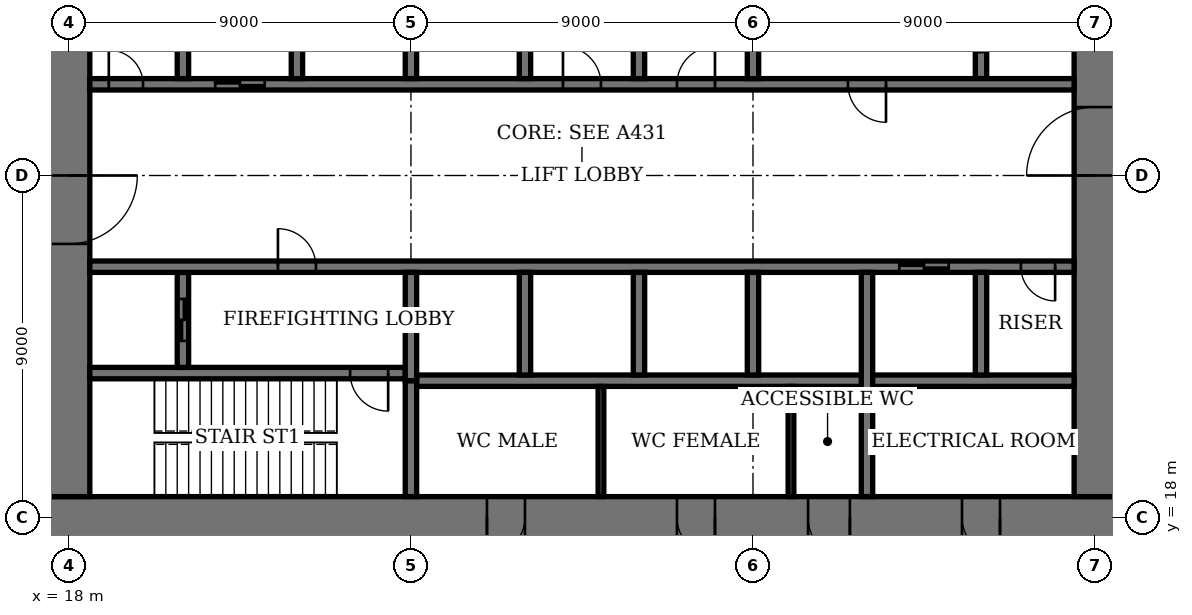
"""IFC4 building model, lengths in metres.
Left out: names, types, materials, properties, quantities, classifications, styles, units other than length and angle.
Written with IfcOpenShell. Run it as: python <this file> out.ifc"""

import sys

from ifc_helpers import new_model, si_unit, direction, frame, frame_2d, origin, place, context, subcontext, project, spatial, rectangle, extrude, element, fill, save


model = new_model("IFC4")
c1 = context("Model", 3, precision=1e-05, world=origin(), true_north=direction((0.0, 1.0)))
c2 = subcontext(c1, "Body", "Model", "MODEL_VIEW")
j1 = project(units=[si_unit("LENGTHUNIT", "METRE"), si_unit("PLANEANGLEUNIT", "RADIAN")], contexts=[c1])
p1 = place(None, origin())
s1 = spatial("IfcSite", under=j1, at=p1, CompositionType="ELEMENT")
p2 = place(p1, origin())
s2 = spatial("IfcBuilding", under=s1, at=p2, CompositionType="ELEMENT")
p3 = place(p2, frame((0.0, 0.0, 234.4)))
s3 = spatial("IfcBuildingStorey", under=s2, at=p3, CompositionType="ELEMENT", Elevation=234.4)
p4 = place(p3, frame((17.45, 18.0, 0.0), z_axis=(0.0, 0.0, 1.0), x_axis=(1.0, 0.0, 0.0)))
e1 = element("IfcWall", 1, at=p4, inside=s3, PredefinedType="SHEAR", context=c2, shape_type="SweptSolid", body=[
    extrude(rectangle(XDim=28.1, YDim=1.1, at=frame_2d((14.05, 0.0))), origin(), (0.0, 0.0, 1.0), 5.0),
])
p5 = place(p4, frame((11.55, 0.0, 0.0)))
e2 = element("IfcOpeningElement", 2, at=p5, cuts=e1, PredefinedType="OPENING", context=c2, shape_type="SweptSolid", body=[
    extrude(rectangle(XDim=1.0, YDim=2.4, at=frame_2d((0.5, 1.2))), frame((0.0, 0.56, 0.0), z_axis=(0.0, -1.0, 0.0), x_axis=(1.0, 0.0, 0.0)), (0.0, 0.0, 1.0), 1.12),
])
p6 = place(p4, frame((16.55, 0.0, 0.0)))
e3 = element("IfcOpeningElement", 3, at=p6, cuts=e1, PredefinedType="OPENING", context=c2, shape_type="SweptSolid", body=[
    extrude(rectangle(XDim=1.0, YDim=2.4, at=frame_2d((0.5, 1.2))), frame((0.0, 0.56, 0.0), z_axis=(0.0, -1.0, 0.0), x_axis=(1.0, 0.0, 0.0)), (0.0, 0.0, 1.0), 1.12),
])
p7 = place(p4, frame((20.0, 0.0, 0.0)))
e4 = element("IfcOpeningElement", 4, at=p7, cuts=e1, PredefinedType="OPENING", context=c2, shape_type="SweptSolid", body=[
    extrude(rectangle(XDim=1.1, YDim=2.4, at=frame_2d((0.55, 1.2))), frame((0.0, 0.56, 0.0), z_axis=(0.0, -1.0, 0.0), x_axis=(1.0, 0.0, 0.0)), (0.0, 0.0, 1.0), 1.12),
])
p8 = place(p4, frame((24.05, 0.0, 0.0)))
e5 = element("IfcOpeningElement", 5, at=p8, cuts=e1, PredefinedType="OPENING", context=c2, shape_type="SweptSolid", body=[
    extrude(rectangle(XDim=1.0, YDim=2.4, at=frame_2d((0.5, 1.2))), frame((0.0, 0.56, 0.0), z_axis=(0.0, -1.0, 0.0), x_axis=(1.0, 0.0, 0.0)), (0.0, 0.0, 1.0), 1.12),
])
p9 = place(p3, frame((18.0, 35.45, 0.0), z_axis=(0.0, 0.0, 1.0), x_axis=(0.0, -1.0, 0.0)))
e6 = element("IfcWall", 6, at=p9, inside=s3, PredefinedType="SHEAR", context=c2, shape_type="SweptSolid", body=[
    extrude(rectangle(XDim=16.9, YDim=1.1, at=frame_2d((8.45, 0.0))), origin(), (0.0, 0.0, 1.0), 5.0),
])
p10 = place(p9, frame((8.45, 0.0, 0.0)))
e7 = element("IfcOpeningElement", 7, at=p10, cuts=e6, PredefinedType="OPENING", context=c2, shape_type="SweptSolid", body=[
    extrude(rectangle(XDim=1.8, YDim=2.4, at=frame_2d((0.9, 1.2))), frame((0.0, 0.56, 0.0), z_axis=(0.0, -1.0, 0.0), x_axis=(1.0, 0.0, 0.0)), (0.0, 0.0, 1.0), 1.12),
])
p11 = place(p3, frame((45.0, 18.55, 0.0), z_axis=(0.0, 0.0, 1.0), x_axis=(0.0, 1.0, 0.0)))
e8 = element("IfcWall", 8, at=p11, inside=s3, PredefinedType="SHEAR", context=c2, shape_type="SweptSolid", body=[
    extrude(rectangle(XDim=16.9, YDim=1.1, at=frame_2d((8.45, 0.0))), origin(), (0.0, 0.0, 1.0), 5.0),
])
p12 = place(p11, frame((8.45, 0.0, 0.0)))
e9 = element("IfcOpeningElement", 9, at=p12, cuts=e8, PredefinedType="OPENING", context=c2, shape_type="SweptSolid", body=[
    extrude(rectangle(XDim=1.8, YDim=2.4, at=frame_2d((0.9, 1.2))), frame((0.0, 0.56, 0.0), z_axis=(0.0, -1.0, 0.0), x_axis=(1.0, 0.0, 0.0)), (0.0, 0.0, 1.0), 1.12),
])
p13 = place(p3, frame((18.55, 21.8, 0.0), z_axis=(0.0, 0.0, 1.0), x_axis=(1.0, 0.0, 0.0)))
e10 = element("IfcWall", 10, at=p13, inside=s3, PredefinedType="SHEAR", context=c2, shape_type="SweptSolid", body=[
    extrude(rectangle(XDim=8.3, YDim=0.3, at=frame_2d((4.15, 0.0))), origin(), (0.0, 0.0, 1.0), 5.0),
])
p14 = place(p13, frame((6.85, 0.0, 0.0)))
e11 = element("IfcOpeningElement", 11, at=p14, cuts=e10, PredefinedType="OPENING", context=c2, shape_type="SweptSolid", body=[
    extrude(rectangle(XDim=1.0, YDim=2.4, at=frame_2d((0.5, 1.2))), frame((0.0, 0.16, 0.0), z_axis=(0.0, -1.0, 0.0), x_axis=(1.0, 0.0, 0.0)), (0.0, 0.0, 1.0), 0.32),
])
p15 = place(p3, frame((27.0, 18.55, 0.0), z_axis=(0.0, 0.0, 1.0), x_axis=(0.0, 1.0, 0.0)))
e12 = element("IfcWall", 12, at=p15, inside=s3, PredefinedType="SHEAR", context=c2, shape_type="SweptSolid", body=[
    extrude(rectangle(XDim=3.05, YDim=0.3, at=frame_2d((1.525, 0.0))), origin(), (0.0, 0.0, 1.0), 5.0),
])
p16 = place(p3, frame((21.0, 21.95, 0.0), z_axis=(0.0, 0.0, 1.0), x_axis=(0.0, 1.0, 0.0)))
e13 = element("IfcWall", 13, at=p16, inside=s3, PredefinedType="SHEAR", context=c2, shape_type="SweptSolid", body=[
    extrude(rectangle(XDim=2.5, YDim=0.3, at=frame_2d((1.25, 0.0))), origin(), (0.0, 0.0, 1.0), 5.0),
])
p17 = place(p16, frame((0.7, 0.0, 0.0)))
e14 = element("IfcOpeningElement", 14, at=p17, cuts=e13, PredefinedType="OPENING", context=c2, shape_type="SweptSolid", body=[
    extrude(rectangle(XDim=1.1, YDim=2.4, at=frame_2d((0.55, 1.2))), frame((0.0, 0.16, 0.0), z_axis=(0.0, -1.0, 0.0), x_axis=(1.0, 0.0, 0.0)), (0.0, 0.0, 1.0), 0.32),
])
p18 = place(p3, frame((42.0, 29.55, 0.0), z_axis=(0.0, 0.0, 1.0), x_axis=(0.0, 1.0, 0.0)))
e15 = element("IfcWall", 15, at=p18, inside=s3, PredefinedType="SHEAR", context=c2, shape_type="SweptSolid", body=[
    extrude(rectangle(XDim=2.5, YDim=0.3, at=frame_2d((1.25, 0.0))), origin(), (0.0, 0.0, 1.0), 5.0),
])
p19 = place(p18, frame((0.7, 0.0, 0.0)))
e16 = element("IfcOpeningElement", 16, at=p19, cuts=e15, PredefinedType="OPENING", context=c2, shape_type="SweptSolid", body=[
    extrude(rectangle(XDim=1.1, YDim=2.4, at=frame_2d((0.55, 1.2))), frame((0.0, 0.16, 0.0), z_axis=(0.0, -1.0, 0.0), x_axis=(1.0, 0.0, 0.0)), (0.0, 0.0, 1.0), 0.32),
])
p20 = place(p3, frame((18.55, 24.6, 0.0), z_axis=(0.0, 0.0, 1.0), x_axis=(1.0, 0.0, 0.0)))
e17 = element("IfcWall", 17, at=p20, inside=s3, PredefinedType="SHEAR", context=c2, shape_type="SweptSolid", body=[
    extrude(rectangle(XDim=25.9, YDim=0.3, at=frame_2d((12.95, 0.0))), origin(), (0.0, 0.0, 1.0), 5.0),
])
p21 = place(p20, frame((4.95, 0.0, 0.0)))
e18 = element("IfcOpeningElement", 18, at=p21, cuts=e17, PredefinedType="OPENING", context=c2, shape_type="SweptSolid", body=[
    extrude(rectangle(XDim=1.0, YDim=2.4, at=frame_2d((0.5, 1.2))), frame((0.0, 0.16, 0.0), z_axis=(0.0, -1.0, 0.0), x_axis=(1.0, 0.0, 0.0)), (0.0, 0.0, 1.0), 0.32),
])
p22 = place(p20, frame((24.5, 0.0, 0.0)))
e19 = element("IfcOpeningElement", 19, at=p22, cuts=e17, PredefinedType="OPENING", context=c2, shape_type="SweptSolid", body=[
    extrude(rectangle(XDim=0.9, YDim=2.1, at=frame_2d((0.45, 1.05))), frame((0.0, 0.16, 0.0), z_axis=(0.0, -1.0, 0.0), x_axis=(1.0, 0.0, 0.0)), (0.0, 0.0, 1.0), 0.32),
])
p23 = place(p20, frame((21.3, 0.0, 0.0)))
e20 = element("IfcOpeningElement", 20, at=p23, cuts=e17, PredefinedType="OPENING", context=c2, shape_type="SweptSolid", body=[
    extrude(rectangle(XDim=1.3, YDim=2.4, at=frame_2d((0.65, 1.2))), frame((0.0, 0.16, 0.0), z_axis=(0.0, -1.0, 0.0), x_axis=(1.0, 0.0, 0.0)), (0.0, 0.0, 1.0), 0.32),
])
p24 = place(p3, frame((18.55, 29.4, 0.0), z_axis=(0.0, 0.0, 1.0), x_axis=(1.0, 0.0, 0.0)))
e21 = element("IfcWall", 21, at=p24, inside=s3, PredefinedType="SHEAR", context=c2, shape_type="SweptSolid", body=[
    extrude(rectangle(XDim=25.9, YDim=0.3, at=frame_2d((12.95, 0.0))), origin(), (0.0, 0.0, 1.0), 5.0),
])
p25 = place(p24, frame((19.95, 0.0, 0.0)))
e22 = element("IfcOpeningElement", 22, at=p25, cuts=e21, PredefinedType="OPENING", context=c2, shape_type="SweptSolid", body=[
    extrude(rectangle(XDim=1.0, YDim=2.4, at=frame_2d((0.5, 1.2))), frame((0.0, 0.16, 0.0), z_axis=(0.0, -1.0, 0.0), x_axis=(1.0, 0.0, 0.0)), (0.0, 0.0, 1.0), 0.32),
])
p26 = place(p24, frame((0.5, 0.0, 0.0)))
e23 = element("IfcOpeningElement", 23, at=p26, cuts=e21, PredefinedType="OPENING", context=c2, shape_type="SweptSolid", body=[
    extrude(rectangle(XDim=0.9, YDim=2.1, at=frame_2d((0.45, 1.05))), frame((0.0, 0.16, 0.0), z_axis=(0.0, -1.0, 0.0), x_axis=(1.0, 0.0, 0.0)), (0.0, 0.0, 1.0), 0.32),
])
p27 = place(p24, frame((15.45, 0.0, 0.0)))
e24 = element("IfcOpeningElement", 24, at=p27, cuts=e21, PredefinedType="OPENING", context=c2, shape_type="SweptSolid", body=[
    extrude(rectangle(XDim=1.0, YDim=2.4, at=frame_2d((0.5, 1.2))), frame((0.0, 0.16, 0.0), z_axis=(0.0, -1.0, 0.0), x_axis=(1.0, 0.0, 0.0)), (0.0, 0.0, 1.0), 0.32),
])
p28 = place(p24, frame((12.45, 0.0, 0.0)))
e25 = element("IfcOpeningElement", 25, at=p28, cuts=e21, PredefinedType="OPENING", context=c2, shape_type="SweptSolid", body=[
    extrude(rectangle(XDim=1.0, YDim=2.4, at=frame_2d((0.5, 1.2))), frame((0.0, 0.16, 0.0), z_axis=(0.0, -1.0, 0.0), x_axis=(1.0, 0.0, 0.0)), (0.0, 0.0, 1.0), 0.32),
])
p29 = place(p24, frame((3.3, 0.0, 0.0)))
e26 = element("IfcOpeningElement", 26, at=p29, cuts=e21, PredefinedType="OPENING", context=c2, shape_type="SweptSolid", body=[
    extrude(rectangle(XDim=1.3, YDim=2.4, at=frame_2d((0.65, 1.2))), frame((0.0, 0.16, 0.0), z_axis=(0.0, -1.0, 0.0), x_axis=(1.0, 0.0, 0.0)), (0.0, 0.0, 1.0), 0.32),
])
p30 = place(p3, frame((27.15, 21.6, 0.0), z_axis=(0.0, 0.0, 1.0), x_axis=(1.0, 0.0, 0.0)))
e27 = element("IfcWall", 27, at=p30, inside=s3, PredefinedType="SHEAR", context=c2, shape_type="SweptSolid", body=[
    extrude(rectangle(XDim=17.3, YDim=0.3, at=frame_2d((8.65, 0.0))), origin(), (0.0, 0.0, 1.0), 5.0),
])
for number, where, z_axis, x_axis in (
    (28, (30.0, 21.75, 0.0), (0.0, 0.0, 1.0), (0.0, 1.0, 0.0)),
    (29, (33.0, 29.55, 0.0), (0.0, 0.0, 1.0), (0.0, 1.0, 0.0)),
    (30, (33.0, 21.75, 0.0), (0.0, 0.0, 1.0), (0.0, 1.0, 0.0)),
    (31, (30.0, 29.55, 0.0), (0.0, 0.0, 1.0), (0.0, 1.0, 0.0)),
    (32, (36.0, 21.75, 0.0), (0.0, 0.0, 1.0), (0.0, 1.0, 0.0)),
    (33, (27.0, 29.55, 0.0), (0.0, 0.0, 1.0), (0.0, 1.0, 0.0)),
):
    element("IfcWall", number, at=place(p3, frame(where, z_axis=z_axis, x_axis=x_axis)), inside=s3, PredefinedType="SHEAR", context=c2, shape_type="SweptSolid", body=[
        extrude(rectangle(XDim=2.7, YDim=0.3, at=frame_2d((1.35, 0.0))), origin(), (0.0, 0.0, 1.0), 5.0),
    ])
for number, where, z_axis, x_axis in (
    (34, (39.0, 18.55, 0.0), (0.0, 0.0, 1.0), (0.0, 1.0, 0.0)),
    (35, (24.0, 29.55, 0.0), (0.0, 0.0, 1.0), (0.0, 1.0, 0.0)),
):
    element("IfcWall", number, at=place(p3, frame(where, z_axis=z_axis, x_axis=x_axis)), inside=s3, PredefinedType="SHEAR", context=c2, shape_type="SweptSolid", body=[
        extrude(rectangle(XDim=5.9, YDim=0.3, at=frame_2d((2.95, 0.0))), origin(), (0.0, 0.0, 1.0), 5.0),
    ])
for number, where, z_axis, x_axis in (
    (36, (42.0, 21.75, 0.0), (0.0, 0.0, 1.0), (0.0, 1.0, 0.0)),
    (37, (21.0, 29.55, 0.0), (0.0, 0.0, 1.0), (0.0, 1.0, 0.0)),
):
    element("IfcWall", number, at=place(p3, frame(where, z_axis=z_axis, x_axis=x_axis)), inside=s3, PredefinedType="SHEAR", context=c2, shape_type="SweptSolid", body=[
        extrude(rectangle(XDim=2.7, YDim=0.3, at=frame_2d((1.35, 0.0))), origin(), (0.0, 0.0, 1.0), 5.0),
    ])
for number, where, z_axis, x_axis in (
    (38, (27.0, 21.6, 0.0), (0.0, 0.0, 1.0), (0.0, 1.0, 0.0)),
    (39, (36.0, 29.55, 0.0), (0.0, 0.0, 1.0), (0.0, 1.0, 0.0)),
):
    element("IfcWall", number, at=place(p3, frame(where, z_axis=z_axis, x_axis=x_axis)), inside=s3, PredefinedType="SHEAR", context=c2, shape_type="SweptSolid", body=[
        extrude(rectangle(XDim=2.85, YDim=0.3, at=frame_2d((1.425, 0.0))), origin(), (0.0, 0.0, 1.0), 5.0),
    ])
for number, where, z_axis, x_axis in (
    (40, (32.0, 18.55, 0.0), (0.0, 0.0, 1.0), (0.0, 1.0, 0.0)),
    (41, (37.0, 18.55, 0.0), (0.0, 0.0, 1.0), (0.0, 1.0, 0.0)),
):
    element("IfcWall", number, at=place(p3, frame(where, z_axis=z_axis, x_axis=x_axis)), inside=s3, PredefinedType="PARTITIONING", context=c2, shape_type="SweptSolid", body=[
        extrude(rectangle(XDim=2.9, YDim=0.15, at=frame_2d((1.45, 0.0))), origin(), (0.0, 0.0, 1.0), 4.6),
    ])
p31 = place(p10, origin())
e42 = element("IfcDoor", 42, at=p31, inside=s3, OperationType="DOUBLE_DOOR_DOUBLE_SWING", PredefinedType="DOOR", context=c2, shape_type="SweptSolid", body=[
    extrude(rectangle(XDim=1.8, YDim=2.4, at=frame_2d((0.9, 1.2))), frame((0.0, 0.03, 0.0), z_axis=(0.0, -1.0, 0.0), x_axis=(1.0, 0.0, 0.0)), (0.0, 0.0, 1.0), 0.06),
    extrude(rectangle(XDim=0.04, YDim=2.4, at=frame_2d((0.02, 1.2))), frame((0.0, 0.55, 0.0), z_axis=(0.0, -1.0, 0.0), x_axis=(1.0, 0.0, 0.0)), (0.0, 0.0, 1.0), 1.1),
    extrude(rectangle(XDim=0.04, YDim=2.4, at=frame_2d((1.78, 1.2))), frame((0.0, 0.55, 0.0), z_axis=(0.0, -1.0, 0.0), x_axis=(1.0, 0.0, 0.0)), (0.0, 0.0, 1.0), 1.1),
    extrude(rectangle(XDim=1.8, YDim=0.04, at=frame_2d((0.9, 2.38))), frame((0.0, 0.55, 0.0), z_axis=(0.0, -1.0, 0.0), x_axis=(1.0, 0.0, 0.0)), (0.0, 0.0, 1.0), 1.1),
])
fill(e7, e42)
p32 = place(p12, origin())
e43 = element("IfcDoor", 43, at=p32, inside=s3, OperationType="DOUBLE_DOOR_DOUBLE_SWING", PredefinedType="DOOR", context=c2, shape_type="SweptSolid", body=[
    extrude(rectangle(XDim=1.8, YDim=2.4, at=frame_2d((0.9, 1.2))), frame((0.0, 0.03, 0.0), z_axis=(0.0, -1.0, 0.0), x_axis=(1.0, 0.0, 0.0)), (0.0, 0.0, 1.0), 0.06),
    extrude(rectangle(XDim=0.04, YDim=2.4, at=frame_2d((0.02, 1.2))), frame((0.0, 0.55, 0.0), z_axis=(0.0, -1.0, 0.0), x_axis=(1.0, 0.0, 0.0)), (0.0, 0.0, 1.0), 1.1),
    extrude(rectangle(XDim=0.04, YDim=2.4, at=frame_2d((1.78, 1.2))), frame((0.0, 0.55, 0.0), z_axis=(0.0, -1.0, 0.0), x_axis=(1.0, 0.0, 0.0)), (0.0, 0.0, 1.0), 1.1),
    extrude(rectangle(XDim=1.8, YDim=0.04, at=frame_2d((0.9, 2.38))), frame((0.0, 0.55, 0.0), z_axis=(0.0, -1.0, 0.0), x_axis=(1.0, 0.0, 0.0)), (0.0, 0.0, 1.0), 1.1),
])
fill(e9, e43)
p33 = place(p5, origin())
e44 = element("IfcDoor", 44, at=p33, inside=s3, OperationType="SINGLE_SWING_LEFT", PredefinedType="DOOR", context=c2, shape_type="SweptSolid", body=[
    extrude(rectangle(XDim=1.0, YDim=2.4, at=frame_2d((0.5, 1.2))), frame((0.0, 0.025, 0.0), z_axis=(0.0, -1.0, 0.0), x_axis=(1.0, 0.0, 0.0)), (0.0, 0.0, 1.0), 0.05),
    extrude(rectangle(XDim=0.04, YDim=2.4, at=frame_2d((0.02, 1.2))), frame((0.0, 0.4, 0.0), z_axis=(0.0, -1.0, 0.0), x_axis=(1.0, 0.0, 0.0)), (0.0, 0.0, 1.0), 0.8),
    extrude(rectangle(XDim=0.04, YDim=2.4, at=frame_2d((0.98, 1.2))), frame((0.0, 0.4, 0.0), z_axis=(0.0, -1.0, 0.0), x_axis=(1.0, 0.0, 0.0)), (0.0, 0.0, 1.0), 0.8),
    extrude(rectangle(XDim=1.0, YDim=0.04, at=frame_2d((0.5, 2.38))), frame((0.0, 0.4, 0.0), z_axis=(0.0, -1.0, 0.0), x_axis=(1.0, 0.0, 0.0)), (0.0, 0.0, 1.0), 0.8),
])
fill(e2, e44)
p34 = place(p6, origin())
e45 = element("IfcDoor", 45, at=p34, inside=s3, OperationType="SINGLE_SWING_RIGHT", PredefinedType="DOOR", context=c2, shape_type="SweptSolid", body=[
    extrude(rectangle(XDim=1.0, YDim=2.4, at=frame_2d((0.5, 1.2))), frame((0.0, 0.025, 0.0), z_axis=(0.0, -1.0, 0.0), x_axis=(1.0, 0.0, 0.0)), (0.0, 0.0, 1.0), 0.05),
    extrude(rectangle(XDim=0.04, YDim=2.4, at=frame_2d((0.02, 1.2))), frame((0.0, 0.4, 0.0), z_axis=(0.0, -1.0, 0.0), x_axis=(1.0, 0.0, 0.0)), (0.0, 0.0, 1.0), 0.8),
    extrude(rectangle(XDim=0.04, YDim=2.4, at=frame_2d((0.98, 1.2))), frame((0.0, 0.4, 0.0), z_axis=(0.0, -1.0, 0.0), x_axis=(1.0, 0.0, 0.0)), (0.0, 0.0, 1.0), 0.8),
    extrude(rectangle(XDim=1.0, YDim=0.04, at=frame_2d((0.5, 2.38))), frame((0.0, 0.4, 0.0), z_axis=(0.0, -1.0, 0.0), x_axis=(1.0, 0.0, 0.0)), (0.0, 0.0, 1.0), 0.8),
])
fill(e3, e45)
p35 = place(p7, origin())
e46 = element("IfcDoor", 46, at=p35, inside=s3, OperationType="SINGLE_SWING_RIGHT", PredefinedType="DOOR", context=c2, shape_type="SweptSolid", body=[
    extrude(rectangle(XDim=1.1, YDim=2.4, at=frame_2d((0.55, 1.2))), frame((0.0, 0.025, 0.0), z_axis=(0.0, -1.0, 0.0), x_axis=(1.0, 0.0, 0.0)), (0.0, 0.0, 1.0), 0.05),
    extrude(rectangle(XDim=0.04, YDim=2.4, at=frame_2d((0.02, 1.2))), frame((0.0, 0.44, 0.0), z_axis=(0.0, -1.0, 0.0), x_axis=(1.0, 0.0, 0.0)), (0.0, 0.0, 1.0), 0.88),
    extrude(rectangle(XDim=0.04, YDim=2.4, at=frame_2d((1.08, 1.2))), frame((0.0, 0.44, 0.0), z_axis=(0.0, -1.0, 0.0), x_axis=(1.0, 0.0, 0.0)), (0.0, 0.0, 1.0), 0.88),
    extrude(rectangle(XDim=1.1, YDim=0.04, at=frame_2d((0.55, 2.38))), frame((0.0, 0.44, 0.0), z_axis=(0.0, -1.0, 0.0), x_axis=(1.0, 0.0, 0.0)), (0.0, 0.0, 1.0), 0.88),
])
fill(e4, e46)
p36 = place(p8, origin())
e47 = element("IfcDoor", 47, at=p36, inside=s3, OperationType="SINGLE_SWING_RIGHT", PredefinedType="DOOR", context=c2, shape_type="SweptSolid", body=[
    extrude(rectangle(XDim=1.0, YDim=2.4, at=frame_2d((0.5, 1.2))), frame((0.0, 0.025, 0.0), z_axis=(0.0, -1.0, 0.0), x_axis=(1.0, 0.0, 0.0)), (0.0, 0.0, 1.0), 0.05),
    extrude(rectangle(XDim=0.04, YDim=2.4, at=frame_2d((0.02, 1.2))), frame((0.0, 0.4, 0.0), z_axis=(0.0, -1.0, 0.0), x_axis=(1.0, 0.0, 0.0)), (0.0, 0.0, 1.0), 0.8),
    extrude(rectangle(XDim=0.04, YDim=2.4, at=frame_2d((0.98, 1.2))), frame((0.0, 0.4, 0.0), z_axis=(0.0, -1.0, 0.0), x_axis=(1.0, 0.0, 0.0)), (0.0, 0.0, 1.0), 0.8),
    extrude(rectangle(XDim=1.0, YDim=0.04, at=frame_2d((0.5, 2.38))), frame((0.0, 0.4, 0.0), z_axis=(0.0, -1.0, 0.0), x_axis=(1.0, 0.0, 0.0)), (0.0, 0.0, 1.0), 0.8),
])
fill(e5, e47)
p37 = place(p14, origin())
e48 = element("IfcDoor", 48, at=p37, inside=s3, OperationType="SINGLE_SWING_RIGHT", PredefinedType="DOOR", context=c2, shape_type="SweptSolid", body=[
    extrude(rectangle(XDim=1.0, YDim=2.4, at=frame_2d((0.5, 1.2))), frame((0.0, 0.03, 0.0), z_axis=(0.0, -1.0, 0.0), x_axis=(1.0, 0.0, 0.0)), (0.0, 0.0, 1.0), 0.06),
])
fill(e11, e48)
p38 = place(p21, origin())
e49 = element("IfcDoor", 49, at=p38, inside=s3, OperationType="SINGLE_SWING_RIGHT", PredefinedType="DOOR", context=c2, shape_type="SweptSolid", body=[
    extrude(rectangle(XDim=1.0, YDim=2.4, at=frame_2d((0.5, 1.2))), frame((0.0, 0.03, 0.0), z_axis=(0.0, -1.0, 0.0), x_axis=(1.0, 0.0, 0.0)), (0.0, 0.0, 1.0), 0.06),
])
fill(e18, e49)
p39 = place(p25, origin())
e50 = element("IfcDoor", 50, at=p39, inside=s3, OperationType="SINGLE_SWING_RIGHT", PredefinedType="DOOR", context=c2, shape_type="SweptSolid", body=[
    extrude(rectangle(XDim=1.0, YDim=2.4, at=frame_2d((0.5, 1.2))), frame((0.0, 0.03, 0.0), z_axis=(0.0, -1.0, 0.0), x_axis=(1.0, 0.0, 0.0)), (0.0, 0.0, 1.0), 0.06),
])
fill(e22, e50)
p40 = place(p22, origin())
e51 = element("IfcDoor", 51, at=p40, inside=s3, OperationType="SINGLE_SWING_RIGHT", PredefinedType="DOOR", context=c2, shape_type="SweptSolid", body=[
    extrude(rectangle(XDim=0.9, YDim=2.1, at=frame_2d((0.45, 1.05))), frame((0.0, 0.03, 0.0), z_axis=(0.0, -1.0, 0.0), x_axis=(1.0, 0.0, 0.0)), (0.0, 0.0, 1.0), 0.06),
])
fill(e19, e51)
p41 = place(p26, origin())
e52 = element("IfcDoor", 52, at=p41, inside=s3, OperationType="SINGLE_SWING_RIGHT", PredefinedType="DOOR", context=c2, shape_type="SweptSolid", body=[
    extrude(rectangle(XDim=0.9, YDim=2.1, at=frame_2d((0.45, 1.05))), frame((0.0, 0.03, 0.0), z_axis=(0.0, -1.0, 0.0), x_axis=(1.0, 0.0, 0.0)), (0.0, 0.0, 1.0), 0.06),
])
fill(e23, e52)
p42 = place(p27, origin())
e53 = element("IfcDoor", 53, at=p42, inside=s3, OperationType="SINGLE_SWING_LEFT", PredefinedType="DOOR", context=c2, shape_type="SweptSolid", body=[
    extrude(rectangle(XDim=1.0, YDim=2.4, at=frame_2d((0.5, 1.2))), frame((0.0, 0.03, 0.0), z_axis=(0.0, -1.0, 0.0), x_axis=(1.0, 0.0, 0.0)), (0.0, 0.0, 1.0), 0.06),
])
fill(e24, e53)
p43 = place(p28, origin())
e54 = element("IfcDoor", 54, at=p43, inside=s3, OperationType="SINGLE_SWING_RIGHT", PredefinedType="DOOR", context=c2, shape_type="SweptSolid", body=[
    extrude(rectangle(XDim=1.0, YDim=2.4, at=frame_2d((0.5, 1.2))), frame((0.0, 0.03, 0.0), z_axis=(0.0, -1.0, 0.0), x_axis=(1.0, 0.0, 0.0)), (0.0, 0.0, 1.0), 0.06),
])
fill(e25, e54)
p44 = place(p23, origin())
e55 = element("IfcDoor", 55, at=p44, inside=s3, OperationType="DOUBLE_DOOR_SLIDING", PredefinedType="DOOR", context=c2, shape_type="SweptSolid", body=[
    extrude(rectangle(XDim=1.3, YDim=2.4, at=frame_2d((0.65, 1.2))), frame((0.0, 0.02, 0.0), z_axis=(0.0, -1.0, 0.0), x_axis=(1.0, 0.0, 0.0)), (0.0, 0.0, 1.0), 0.04),
])
fill(e20, e55)
p45 = place(p29, origin())
e56 = element("IfcDoor", 56, at=p45, inside=s3, OperationType="DOUBLE_DOOR_SLIDING", PredefinedType="DOOR", context=c2, shape_type="SweptSolid", body=[
    extrude(rectangle(XDim=1.3, YDim=2.4, at=frame_2d((0.65, 1.2))), frame((0.0, 0.02, 0.0), z_axis=(0.0, -1.0, 0.0), x_axis=(1.0, 0.0, 0.0)), (0.0, 0.0, 1.0), 0.04),
])
fill(e26, e56)
p46 = place(p17, origin())
e57 = element("IfcDoor", 57, at=p46, inside=s3, OperationType="DOUBLE_DOOR_SLIDING", PredefinedType="DOOR", context=c2, shape_type="SweptSolid", body=[
    extrude(rectangle(XDim=1.1, YDim=2.4, at=frame_2d((0.55, 1.2))), frame((0.0, 0.03, 0.0), z_axis=(0.0, -1.0, 0.0), x_axis=(1.0, 0.0, 0.0)), (0.0, 0.0, 1.0), 0.06),
])
fill(e14, e57)
save(model, sys.argv[1])
